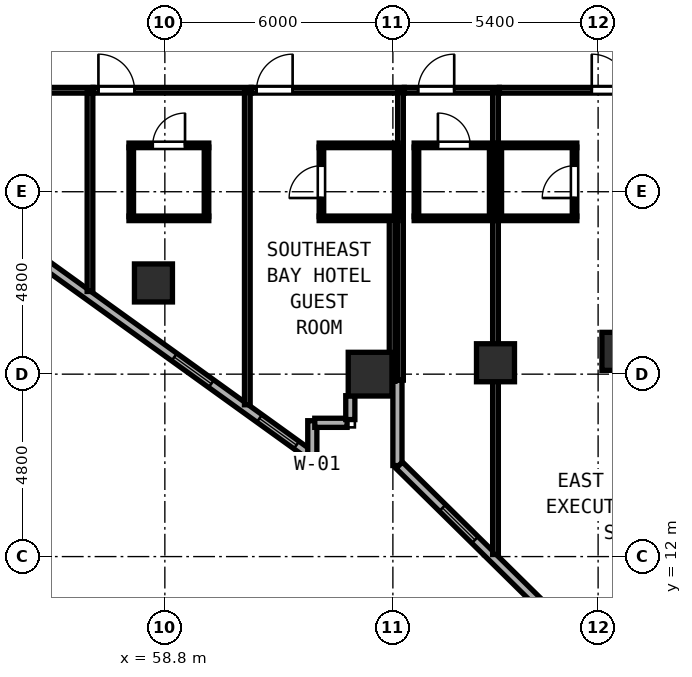
"""IFC4 building model, lengths in metres.
Left out: names, types, materials, properties, quantities, classifications, styles, units other than length and angle.
Written with IfcOpenShell. Run it as: python <this file> out.ifc"""

import sys

from ifc_helpers import new_model, si_unit, direction, frame, frame_2d, origin, origin_2d, place, context, subcontext, project, spatial, rectangle, hollow_rectangle, extrude, element, fill, save


model = new_model("IFC4")
c1 = context("Model", 3, precision=1e-05, world=origin(), true_north=direction((0.0, 1.0)))
c2 = subcontext(c1, "Body", "Model", "MODEL_VIEW")
j1 = project(units=[si_unit("LENGTHUNIT", "METRE"), si_unit("PLANEANGLEUNIT", "RADIAN")], contexts=[c1])
p1 = place(None, origin())
s1 = spatial("IfcSite", under=j1, at=p1, CompositionType="ELEMENT")
p2 = place(p1, origin())
s2 = spatial("IfcBuilding", under=s1, at=p2, CompositionType="ELEMENT")
p3 = place(p2, frame((0.0, 0.0, 47.6)))
s3 = spatial("IfcBuildingStorey", under=s2, at=p3, CompositionType="ELEMENT", Elevation=47.6)
p4 = place(p3, frame((64.2, 16.8, 0.0), z_axis=(0.0, 0.0, 1.0), x_axis=(1.0, 0.0, 0.0)))
e1 = element("IfcColumn", 1, at=p4, inside=s3, PredefinedType="COLUMN", context=c2, shape_type="SweptSolid", body=[
    extrude(hollow_rectangle(XDim=1.15, YDim=1.15, WallThickness=0.042, at=origin_2d()), origin(), (0.0, 0.0, 1.0), 3.8),
])
for number, where, z_axis, x_axis in (
    (2, (70.8, 17.4, 0.0), (0.0, 0.0, 1.0), (1.0, 0.0, 0.0)),
    (3, (58.5, 19.2, 0.0), (0.0, 0.0, 1.0), (1.0, 0.0, 0.0)),
    (4, (67.5, 17.1, 0.0), (0.0, 0.0, 1.0), (1.0, 0.0, 0.0)),
):
    element("IfcColumn", number, at=place(p3, frame(where, z_axis=z_axis, x_axis=x_axis)), inside=s3, PredefinedType="COLUMN", context=c2, shape_type="SweptSolid", body=[
        extrude(hollow_rectangle(XDim=1.0, YDim=1.0, WallThickness=0.038, at=origin_2d()), origin(), (0.0, 0.0, 1.0), 3.8),
    ])
p5 = place(p3, frame((53.367, 21.34, 0.0), z_axis=(0.0, 0.0, 1.0), x_axis=(0.811543176492, -0.58429245476, 0.0)))
e5 = element("IfcWall", 5, at=p5, inside=s3, PredefinedType="SOLIDWALL", context=c2, shape_type="SweptSolid", body=[
    extrude(rectangle(XDim=11.531, YDim=0.24, at=frame_2d((5.765, 0.0))), origin(), (0.0, 0.0, 1.0), 3.097),
])
p6 = place(p5, frame((1.6, 0.0, 0.85)))
e6 = element("IfcOpeningElement", 6, at=p6, cuts=e5, PredefinedType="OPENING", context=c2, shape_type="SweptSolid", body=[
    extrude(rectangle(XDim=1.2, YDim=1.85, at=frame_2d((0.6, 0.925))), frame((0.0, 0.13, 0.0), z_axis=(0.0, -1.0, 0.0), x_axis=(1.0, 0.0, 0.0)), (0.0, 0.0, 1.0), 0.26),
])
p7 = place(p5, frame((7.0, 0.0, 0.85)))
e7 = element("IfcOpeningElement", 7, at=p7, cuts=e5, PredefinedType="OPENING", context=c2, shape_type="SweptSolid", body=[
    extrude(rectangle(XDim=1.2, YDim=1.85, at=frame_2d((0.6, 0.925))), frame((0.0, 0.13, 0.0), z_axis=(0.0, -1.0, 0.0), x_axis=(1.0, 0.0, 0.0)), (0.0, 0.0, 1.0), 0.26),
])
p8 = place(p5, frame((9.762, 0.0, 0.85)))
e8 = element("IfcOpeningElement", 8, at=p8, cuts=e5, PredefinedType="OPENING", context=c2, shape_type="SweptSolid", body=[
    extrude(rectangle(XDim=1.2, YDim=1.85, at=frame_2d((0.6, 0.925))), frame((0.0, 0.13, 0.0), z_axis=(0.0, -1.0, 0.0), x_axis=(1.0, 0.0, 0.0)), (0.0, 0.0, 1.0), 0.26),
])
p9 = place(p3, frame((62.68, 14.579, 0.0), z_axis=(0.0, 0.0, 1.0), x_axis=(0.0, 1.0, 0.0)))
e9 = element("IfcWall", 9, at=p9, inside=s3, PredefinedType="SOLIDWALL", context=c2, shape_type="SweptSolid", body=[
    extrude(rectangle(XDim=0.996, YDim=0.24, at=frame_2d((0.498, 0.0))), origin(), (0.0, 0.0, 1.0), 3.6),
])
p10 = place(p3, frame((62.745, 15.52, 0.0), z_axis=(0.0, 0.0, 1.0), x_axis=(1.0, 0.0, 0.0)))
e10 = element("IfcWall", 10, at=p10, inside=s3, PredefinedType="SOLIDWALL", context=c2, shape_type="SweptSolid", body=[
    extrude(rectangle(XDim=0.85, YDim=0.24, at=frame_2d((0.425, 0.0))), origin(), (0.0, 0.0, 1.0), 3.6),
])
p11 = place(p3, frame((63.68, 15.605, 0.0), z_axis=(0.0, 0.0, 1.0), x_axis=(0.0, 1.0, 0.0)))
e11 = element("IfcWall", 11, at=p11, inside=s3, PredefinedType="SOLIDWALL", context=c2, shape_type="SweptSolid", body=[
    extrude(rectangle(XDim=0.628, YDim=0.24, at=frame_2d((0.314, 0.0))), origin(), (0.0, 0.0, 1.0), 3.6),
])
p12 = place(p3, frame((64.92, 16.64, 0.0), z_axis=(0.0, 0.0, 1.0), x_axis=(0.0, -1.0, 0.0)))
e12 = element("IfcWall", 12, at=p12, inside=s3, PredefinedType="SOLIDWALL", context=c2, shape_type="SweptSolid", body=[
    extrude(rectangle(XDim=2.245, YDim=0.24, at=frame_2d((1.122, 0.0))), origin(), (0.0, 0.0, 1.0), 3.6),
])
p13 = place(p3, frame((64.966, 14.405, 0.0), z_axis=(0.0, 0.0, 1.0), x_axis=(0.71217720779, -0.701999732695, 0.0)))
e13 = element("IfcWall", 13, at=p13, inside=s3, PredefinedType="SOLIDWALL", context=c2, shape_type="SweptSolid", body=[
    extrude(rectangle(XDim=10.915, YDim=0.24, at=frame_2d((5.458, 0.0))), origin(), (0.0, 0.0, 1.0), 3.6),
])
p14 = place(p13, frame((1.6, 0.0, 0.85)))
e14 = element("IfcOpeningElement", 14, at=p14, cuts=e13, PredefinedType="OPENING", context=c2, shape_type="SweptSolid", body=[
    extrude(rectangle(XDim=1.2, YDim=1.85, at=frame_2d((0.6, 0.925))), frame((0.0, 0.13, 0.0), z_axis=(0.0, -1.0, 0.0), x_axis=(1.0, 0.0, 0.0)), (0.0, 0.0, 1.0), 0.26),
])
p15 = place(p13, frame((7.0, 0.0, 0.85)))
e15 = element("IfcOpeningElement", 15, at=p15, cuts=e13, PredefinedType="OPENING", context=c2, shape_type="SweptSolid", body=[
    extrude(rectangle(XDim=1.2, YDim=1.85, at=frame_2d((0.6, 0.925))), frame((0.0, 0.13, 0.0), z_axis=(0.0, -1.0, 0.0), x_axis=(1.0, 0.0, 0.0)), (0.0, 0.0, 1.0), 0.26),
])
p16 = place(p3, frame((52.882, 24.27, 0.0), z_axis=(0.0, 0.0, 1.0), x_axis=(1.0, 0.0, 0.0)))
e16 = element("IfcWall", 16, at=p16, inside=s3, PredefinedType="PARTITIONING", context=c2, shape_type="SweptSolid", body=[
    extrude(rectangle(XDim=4.028, YDim=0.15, at=frame_2d((2.014, 0.0))), origin(), (0.0, 0.0, 1.0), 3.6),
])
p17 = place(p16, frame((2.328, 0.0, 0.0), z_axis=(0.0, 0.0, 1.0), x_axis=(-1.0, 0.0, 0.0)))
e17 = element("IfcOpeningElement", 17, at=p17, cuts=e16, PredefinedType="OPENING", context=c2, shape_type="SweptSolid", body=[
    extrude(rectangle(XDim=0.95, YDim=2.12, at=frame_2d((0.475, 1.06))), frame((0.0, 0.085, 0.0), z_axis=(0.0, -1.0, 0.0), x_axis=(1.0, 0.0, 0.0)), (0.0, 0.0, 1.0), 0.17),
])
p18 = place(p3, frame((56.83, 18.976, 0.0), z_axis=(0.0, 0.0, 1.0), x_axis=(0.0, 1.0, 0.0)))
e18 = element("IfcWall", 18, at=p18, inside=s3, PredefinedType="PARTITIONING", context=c2, shape_type="SweptSolid", body=[
    extrude(rectangle(XDim=5.234, YDim=0.15, at=frame_2d((2.617, 0.0))), origin(), (0.0, 0.0, 1.0), 3.6),
])
p19 = place(p3, frame((56.912, 24.27, 0.0), z_axis=(0.0, 0.0, 1.0), x_axis=(1.0, 0.0, 0.0)))
e19 = element("IfcWall", 19, at=p19, inside=s3, PredefinedType="PARTITIONING", context=c2, shape_type="SweptSolid", body=[
    extrude(rectangle(XDim=4.158, YDim=0.15, at=frame_2d((2.079, 0.0))), origin(), (0.0, 0.0, 1.0), 3.6),
])
p20 = place(p19, frame((1.09, 0.0, 0.0), z_axis=(0.0, 0.0, 1.0), x_axis=(-1.0, 0.0, 0.0)))
e20 = element("IfcOpeningElement", 20, at=p20, cuts=e19, PredefinedType="OPENING", context=c2, shape_type="SweptSolid", body=[
    extrude(rectangle(XDim=0.95, YDim=2.15, at=frame_2d((0.475, 1.075))), frame((0.0, 0.085, 0.0), z_axis=(0.0, -1.0, 0.0), x_axis=(1.0, 0.0, 0.0)), (0.0, 0.0, 1.0), 0.17),
])
p21 = place(p3, frame((60.97, 15.995, 0.0), z_axis=(0.0, 0.0, 1.0), x_axis=(0.0, 1.0, 0.0)))
e21 = element("IfcWall", 21, at=p21, inside=s3, PredefinedType="PARTITIONING", context=c2, shape_type="SweptSolid", body=[
    extrude(rectangle(XDim=8.215, YDim=0.15, at=frame_2d((4.107, 0.0))), origin(), (0.0, 0.0, 1.0), 3.6),
])
p22 = place(p3, frame((57.856, 22.82, 0.0), z_axis=(0.0, 0.0, 1.0), x_axis=(1.0, 0.0, 0.0)))
e22 = element("IfcWall", 22, at=p22, inside=s3, PredefinedType="PARTITIONING", context=c2, shape_type="SweptSolid", body=[
    extrude(rectangle(XDim=2.1, YDim=0.12, at=frame_2d((1.05, 0.0))), origin(), (0.0, 0.0, 1.0), 3.6),
])
p23 = place(p22, frame((1.475, 0.0, 0.0), z_axis=(0.0, 0.0, 1.0), x_axis=(-1.0, 0.0, 0.0)))
e23 = element("IfcOpeningElement", 23, at=p23, cuts=e22, PredefinedType="OPENING", context=c2, shape_type="SweptSolid", body=[
    extrude(rectangle(XDim=0.85, YDim=2.1, at=frame_2d((0.425, 1.05))), frame((0.0, 0.07, 0.0), z_axis=(0.0, -1.0, 0.0), x_axis=(1.0, 0.0, 0.0)), (0.0, 0.0, 1.0), 0.14),
])
p24 = place(p3, frame((57.856, 20.9, 0.0), z_axis=(0.0, 0.0, 1.0), x_axis=(1.0, 0.0, 0.0)))
e24 = element("IfcWall", 24, at=p24, inside=s3, PredefinedType="PARTITIONING", context=c2, shape_type="SweptSolid", body=[
    extrude(rectangle(XDim=2.1, YDim=0.12, at=frame_2d((1.05, 0.0))), origin(), (0.0, 0.0, 1.0), 3.6),
])
for number, where, z_axis, x_axis in (
    (25, (57.916, 20.945, 0.0), (0.0, 0.0, 1.0), (0.0, 1.0, 0.0)),
    (26, (59.896, 20.945, 0.0), (0.0, 0.0, 1.0), (0.0, 1.0, 0.0)),
):
    element("IfcWall", number, at=place(p3, frame(where, z_axis=z_axis, x_axis=x_axis)), inside=s3, PredefinedType="PARTITIONING", context=c2, shape_type="SweptSolid", body=[
        extrude(rectangle(XDim=1.83, YDim=0.12, at=frame_2d((0.915, 0.0))), origin(), (0.0, 0.0, 1.0), 3.6),
    ])
p25 = place(p3, frame((61.072, 24.27, 0.0), z_axis=(0.0, 0.0, 1.0), x_axis=(1.0, 0.0, 0.0)))
e27 = element("IfcWall", 27, at=p25, inside=s3, PredefinedType="PARTITIONING", context=c2, shape_type="SweptSolid", body=[
    extrude(rectangle(XDim=4.028, YDim=0.15, at=frame_2d((2.014, 0.0))), origin(), (0.0, 0.0, 1.0), 3.6),
])
p26 = place(p25, frame((1.09, 0.0, 0.0), z_axis=(0.0, 0.0, 1.0), x_axis=(-1.0, 0.0, 0.0)))
e28 = element("IfcOpeningElement", 28, at=p26, cuts=e27, PredefinedType="OPENING", context=c2, shape_type="SweptSolid", body=[
    extrude(rectangle(XDim=0.95, YDim=2.15, at=frame_2d((0.475, 1.075))), frame((0.0, 0.085, 0.0), z_axis=(0.0, -1.0, 0.0), x_axis=(1.0, 0.0, 0.0)), (0.0, 0.0, 1.0), 0.17),
])
p27 = place(p3, frame((65.0, 16.642, 0.0), z_axis=(0.0, 0.0, 1.0), x_axis=(0.0, 1.0, 0.0)))
e29 = element("IfcWall", 29, at=p27, inside=s3, PredefinedType="PARTITIONING", context=c2, shape_type="SweptSolid", body=[
    extrude(rectangle(XDim=7.568, YDim=0.15, at=frame_2d((3.784, 0.0))), origin(), (0.0, 0.0, 1.0), 3.6),
])
for number, where, z_axis, x_axis in (
    (30, (62.86, 22.82, 0.0), (0.0, 0.0, 1.0), (1.0, 0.0, 0.0)),
    (31, (62.86, 20.9, 0.0), (0.0, 0.0, 1.0), (1.0, 0.0, 0.0)),
):
    element("IfcWall", number, at=place(p3, frame(where, z_axis=z_axis, x_axis=x_axis)), inside=s3, PredefinedType="PARTITIONING", context=c2, shape_type="SweptSolid", body=[
        extrude(rectangle(XDim=2.08, YDim=0.12, at=frame_2d((1.04, 0.0))), origin(), (0.0, 0.0, 1.0), 3.6),
    ])
p28 = place(p3, frame((62.92, 20.945, 0.0), z_axis=(0.0, 0.0, 1.0), x_axis=(0.0, 1.0, 0.0)))
e32 = element("IfcWall", 32, at=p28, inside=s3, PredefinedType="PARTITIONING", context=c2, shape_type="SweptSolid", body=[
    extrude(rectangle(XDim=1.83, YDim=0.12, at=frame_2d((0.915, 0.0))), origin(), (0.0, 0.0, 1.0), 3.6),
])
p29 = place(p28, frame((1.34, 0.0, 0.0), z_axis=(0.0, 0.0, 1.0), x_axis=(-1.0, 0.0, 0.0)))
e33 = element("IfcOpeningElement", 33, at=p29, cuts=e32, PredefinedType="OPENING", context=c2, shape_type="SweptSolid", body=[
    extrude(rectangle(XDim=0.85, YDim=2.1, at=frame_2d((0.425, 1.05))), frame((0.0, 0.07, 0.0), z_axis=(0.0, -1.0, 0.0), x_axis=(1.0, 0.0, 0.0)), (0.0, 0.0, 1.0), 0.14),
])
p30 = place(p3, frame((64.9, 20.945, 0.0), z_axis=(0.0, 0.0, 1.0), x_axis=(0.0, 1.0, 0.0)))
e34 = element("IfcWall", 34, at=p30, inside=s3, PredefinedType="PARTITIONING", context=c2, shape_type="SweptSolid", body=[
    extrude(rectangle(XDim=1.83, YDim=0.12, at=frame_2d((0.915, 0.0))), origin(), (0.0, 0.0, 1.0), 3.6),
])
p31 = place(p3, frame((65.102, 24.27, 0.0), z_axis=(0.0, 0.0, 1.0), x_axis=(1.0, 0.0, 0.0)))
e35 = element("IfcWall", 35, at=p31, inside=s3, PredefinedType="PARTITIONING", context=c2, shape_type="SweptSolid", body=[
    extrude(rectangle(XDim=2.498, YDim=0.15, at=frame_2d((1.249, 0.0))), origin(), (0.0, 0.0, 1.0), 3.6),
])
p32 = place(p31, frame((1.312, 0.0, 0.0), z_axis=(0.0, 0.0, 1.0), x_axis=(-1.0, 0.0, 0.0)))
e36 = element("IfcOpeningElement", 36, at=p32, cuts=e35, PredefinedType="OPENING", context=c2, shape_type="SweptSolid", body=[
    extrude(rectangle(XDim=0.95, YDim=2.15, at=frame_2d((0.475, 1.075))), frame((0.0, 0.085, 0.0), z_axis=(0.0, -1.0, 0.0), x_axis=(1.0, 0.0, 0.0)), (0.0, 0.0, 1.0), 0.17),
])
p33 = place(p3, frame((67.5, 12.054, 0.0), z_axis=(0.0, 0.0, 1.0), x_axis=(0.0, 1.0, 0.0)))
e37 = element("IfcWall", 37, at=p33, inside=s3, PredefinedType="PARTITIONING", context=c2, shape_type="SweptSolid", body=[
    extrude(rectangle(XDim=12.156, YDim=0.15, at=frame_2d((6.078, 0.0))), origin(), (0.0, 0.0, 1.0), 3.6),
])
p34 = place(p3, frame((64.78, 16.612, 0.0), z_axis=(0.0, 0.0, 1.0), x_axis=(0.0, 1.0, 0.0)))
e38 = element("IfcWall", 38, at=p34, inside=s3, PredefinedType="PARTITIONING", context=c2, shape_type="SweptSolid", body=[
    extrude(rectangle(XDim=4.243, YDim=0.15, at=frame_2d((2.122, 0.0))), origin(), (0.0, 0.0, 1.0), 3.6),
])
p35 = place(p3, frame((65.36, 22.82, 0.0), z_axis=(0.0, 0.0, 1.0), x_axis=(1.0, 0.0, 0.0)))
e39 = element("IfcWall", 39, at=p35, inside=s3, PredefinedType="PARTITIONING", context=c2, shape_type="SweptSolid", body=[
    extrude(rectangle(XDim=2.08, YDim=0.12, at=frame_2d((1.04, 0.0))), origin(), (0.0, 0.0, 1.0), 3.6),
])
p36 = place(p35, frame((1.475, 0.0, 0.0), z_axis=(0.0, 0.0, 1.0), x_axis=(-1.0, 0.0, 0.0)))
e40 = element("IfcOpeningElement", 40, at=p36, cuts=e39, PredefinedType="OPENING", context=c2, shape_type="SweptSolid", body=[
    extrude(rectangle(XDim=0.85, YDim=2.1, at=frame_2d((0.425, 1.05))), frame((0.0, 0.07, 0.0), z_axis=(0.0, -1.0, 0.0), x_axis=(1.0, 0.0, 0.0)), (0.0, 0.0, 1.0), 0.14),
])
p37 = place(p3, frame((65.36, 20.9, 0.0), z_axis=(0.0, 0.0, 1.0), x_axis=(1.0, 0.0, 0.0)))
e41 = element("IfcWall", 41, at=p37, inside=s3, PredefinedType="PARTITIONING", context=c2, shape_type="SweptSolid", body=[
    extrude(rectangle(XDim=2.08, YDim=0.12, at=frame_2d((1.04, 0.0))), origin(), (0.0, 0.0, 1.0), 3.6),
])
for number, where, z_axis, x_axis in (
    (42, (65.42, 20.945, 0.0), (0.0, 0.0, 1.0), (0.0, 1.0, 0.0)),
    (43, (67.4, 20.945, 0.0), (0.0, 0.0, 1.0), (0.0, 1.0, 0.0)),
):
    element("IfcWall", number, at=place(p3, frame(where, z_axis=z_axis, x_axis=x_axis)), inside=s3, PredefinedType="PARTITIONING", context=c2, shape_type="SweptSolid", body=[
        extrude(rectangle(XDim=1.83, YDim=0.12, at=frame_2d((0.915, 0.0))), origin(), (0.0, 0.0, 1.0), 3.6),
    ])
p38 = place(p3, frame((67.602, 24.27, 0.0), z_axis=(0.0, 0.0, 1.0), x_axis=(1.0, 0.0, 0.0)))
e44 = element("IfcWall", 44, at=p38, inside=s3, PredefinedType="PARTITIONING", context=c2, shape_type="SweptSolid", body=[
    extrude(rectangle(XDim=6.893, YDim=0.15, at=frame_2d((3.447, 0.0))), origin(), (0.0, 0.0, 1.0), 3.6),
])
p39 = place(p38, frame((3.381, 0.0, 0.0), z_axis=(0.0, 0.0, 1.0), x_axis=(-1.0, 0.0, 0.0)))
e45 = element("IfcOpeningElement", 45, at=p39, cuts=e44, PredefinedType="OPENING", context=c2, shape_type="SweptSolid", body=[
    extrude(rectangle(XDim=0.95, YDim=2.18, at=frame_2d((0.475, 1.09))), frame((0.0, 0.085, 0.0), z_axis=(0.0, -1.0, 0.0), x_axis=(1.0, 0.0, 0.0)), (0.0, 0.0, 1.0), 0.17),
])
for number, where, z_axis, x_axis in (
    (46, (67.56, 22.82, 0.0), (0.0, 0.0, 1.0), (1.0, 0.0, 0.0)),
    (47, (67.56, 20.9, 0.0), (0.0, 0.0, 1.0), (1.0, 0.0, 0.0)),
):
    element("IfcWall", number, at=place(p3, frame(where, z_axis=z_axis, x_axis=x_axis)), inside=s3, PredefinedType="PARTITIONING", context=c2, shape_type="SweptSolid", body=[
        extrude(rectangle(XDim=2.08, YDim=0.12, at=frame_2d((1.04, 0.0))), origin(), (0.0, 0.0, 1.0), 3.6),
    ])
p40 = place(p3, frame((67.6, 20.945, 0.0), z_axis=(0.0, 0.0, 1.0), x_axis=(0.0, 1.0, 0.0)))
e48 = element("IfcWall", 48, at=p40, inside=s3, PredefinedType="PARTITIONING", context=c2, shape_type="SweptSolid", body=[
    extrude(rectangle(XDim=1.83, YDim=0.12, at=frame_2d((0.915, 0.0))), origin(), (0.0, 0.0, 1.0), 3.6),
])
p41 = place(p3, frame((69.58, 20.945, 0.0), z_axis=(0.0, 0.0, 1.0), x_axis=(0.0, 1.0, 0.0)))
e49 = element("IfcWall", 49, at=p41, inside=s3, PredefinedType="PARTITIONING", context=c2, shape_type="SweptSolid", body=[
    extrude(rectangle(XDim=1.83, YDim=0.12, at=frame_2d((0.915, 0.0))), origin(), (0.0, 0.0, 1.0), 3.6),
])
p42 = place(p41, frame((0.49, 0.0, 0.0)))
e50 = element("IfcOpeningElement", 50, at=p42, cuts=e49, PredefinedType="OPENING", context=c2, shape_type="SweptSolid", body=[
    extrude(rectangle(XDim=0.85, YDim=2.1, at=frame_2d((0.425, 1.05))), frame((0.0, 0.07, 0.0), z_axis=(0.0, -1.0, 0.0), x_axis=(1.0, 0.0, 0.0)), (0.0, 0.0, 1.0), 0.14),
])
p43 = place(p7, origin())
e51 = element("IfcWindow", 51, at=p43, inside=s3, PartitioningType="SINGLE_PANEL", PredefinedType="WINDOW", context=c2, shape_type="SweptSolid", body=[
    extrude(rectangle(XDim=1.2, YDim=1.85, at=frame_2d((0.6, 0.925))), frame((0.0, 0.03, 0.0), z_axis=(0.0, -1.0, 0.0), x_axis=(1.0, 0.0, 0.0)), (0.0, 0.0, 1.0), 0.06),
])
fill(e7, e51)
p44 = place(p14, origin())
e52 = element("IfcWindow", 52, at=p44, inside=s3, PartitioningType="SINGLE_PANEL", PredefinedType="WINDOW", context=c2, shape_type="SweptSolid", body=[
    extrude(rectangle(XDim=1.2, YDim=1.85, at=frame_2d((0.6, 0.925))), frame((0.0, 0.03, 0.0), z_axis=(0.0, -1.0, 0.0), x_axis=(1.0, 0.0, 0.0)), (0.0, 0.0, 1.0), 0.06),
])
fill(e14, e52)
p45 = place(p20, origin())
e53 = element("IfcDoor", 53, at=p45, inside=s3, OperationType="SINGLE_SWING_RIGHT", PredefinedType="DOOR", context=c2, shape_type="SweptSolid", body=[
    extrude(rectangle(XDim=0.95, YDim=2.15, at=frame_2d((0.475, 1.075))), frame((0.0, 0.025, 0.0), z_axis=(0.0, -1.0, 0.0), x_axis=(1.0, 0.0, 0.0)), (0.0, 0.0, 1.0), 0.05),
])
fill(e20, e53)
p46 = place(p23, origin())
e54 = element("IfcDoor", 54, at=p46, inside=s3, OperationType="SINGLE_SWING_LEFT", PredefinedType="DOOR", context=c2, shape_type="SweptSolid", body=[
    extrude(rectangle(XDim=0.85, YDim=2.1, at=frame_2d((0.425, 1.05))), frame((0.0, 0.025, 0.0), z_axis=(0.0, -1.0, 0.0), x_axis=(1.0, 0.0, 0.0)), (0.0, 0.0, 1.0), 0.05),
])
fill(e23, e54)
p47 = place(p26, origin())
e55 = element("IfcDoor", 55, at=p47, inside=s3, OperationType="SINGLE_SWING_LEFT", PredefinedType="DOOR", context=c2, shape_type="SweptSolid", body=[
    extrude(rectangle(XDim=0.95, YDim=2.15, at=frame_2d((0.475, 1.075))), frame((0.0, 0.025, 0.0), z_axis=(0.0, -1.0, 0.0), x_axis=(1.0, 0.0, 0.0)), (0.0, 0.0, 1.0), 0.05),
])
fill(e28, e55)
p48 = place(p29, origin())
e56 = element("IfcDoor", 56, at=p48, inside=s3, OperationType="SINGLE_SWING_RIGHT", PredefinedType="DOOR", context=c2, shape_type="SweptSolid", body=[
    extrude(rectangle(XDim=0.85, YDim=2.1, at=frame_2d((0.425, 1.05))), frame((0.0, 0.025, 0.0), z_axis=(0.0, -1.0, 0.0), x_axis=(1.0, 0.0, 0.0)), (0.0, 0.0, 1.0), 0.05),
])
fill(e33, e56)
p49 = place(p32, origin())
e57 = element("IfcDoor", 57, at=p49, inside=s3, OperationType="SINGLE_SWING_LEFT", PredefinedType="DOOR", context=c2, shape_type="SweptSolid", body=[
    extrude(rectangle(XDim=0.95, YDim=2.15, at=frame_2d((0.475, 1.075))), frame((0.0, 0.025, 0.0), z_axis=(0.0, -1.0, 0.0), x_axis=(1.0, 0.0, 0.0)), (0.0, 0.0, 1.0), 0.05),
])
fill(e36, e57)
p50 = place(p36, origin())
e58 = element("IfcDoor", 58, at=p50, inside=s3, OperationType="SINGLE_SWING_RIGHT", PredefinedType="DOOR", context=c2, shape_type="SweptSolid", body=[
    extrude(rectangle(XDim=0.85, YDim=2.1, at=frame_2d((0.425, 1.05))), frame((0.0, 0.025, 0.0), z_axis=(0.0, -1.0, 0.0), x_axis=(1.0, 0.0, 0.0)), (0.0, 0.0, 1.0), 0.05),
])
fill(e40, e58)
p51 = place(p39, origin())
e59 = element("IfcDoor", 59, at=p51, inside=s3, OperationType="SINGLE_SWING_RIGHT", PredefinedType="DOOR", context=c2, shape_type="SweptSolid", body=[
    extrude(rectangle(XDim=0.95, YDim=2.18, at=frame_2d((0.475, 1.09))), frame((0.0, 0.025, 0.0), z_axis=(0.0, -1.0, 0.0), x_axis=(1.0, 0.0, 0.0)), (0.0, 0.0, 1.0), 0.05),
])
fill(e45, e59)
p52 = place(p42, origin())
e60 = element("IfcDoor", 60, at=p52, inside=s3, OperationType="SINGLE_SWING_LEFT", PredefinedType="DOOR", context=c2, shape_type="SweptSolid", body=[
    extrude(rectangle(XDim=0.85, YDim=2.1, at=frame_2d((0.425, 1.05))), frame((0.0, 0.025, 0.0), z_axis=(0.0, -1.0, 0.0), x_axis=(1.0, 0.0, 0.0)), (0.0, 0.0, 1.0), 0.05),
])
fill(e50, e60)
p53 = place(p8, origin())
e61 = element("IfcWindow", 61, at=p53, inside=s3, PartitioningType="SINGLE_PANEL", PredefinedType="WINDOW", context=c2, shape_type="SweptSolid", body=[
    extrude(rectangle(XDim=1.2, YDim=1.85, at=frame_2d((0.6, 0.925))), frame((0.0, 0.03, 0.0), z_axis=(0.0, -1.0, 0.0), x_axis=(1.0, 0.0, 0.0)), (0.0, 0.0, 1.0), 0.06),
])
fill(e8, e61)
save(model, sys.argv[1])
